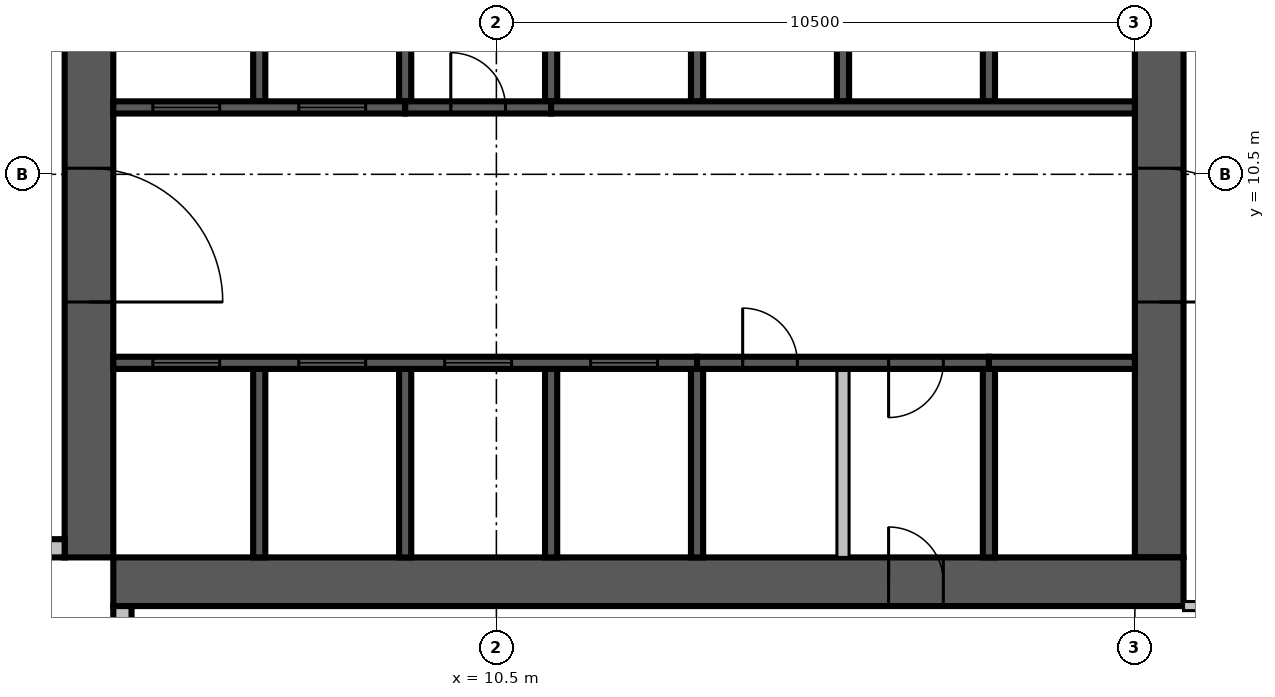
"""IFC4 building model, lengths in metres.
Left out: names, types, materials, properties, quantities, classifications, styles, units other than length and angle.
Written with IfcOpenShell. Run it as: python <this file> out.ifc"""

import sys

from ifc_helpers import new_model, si_unit, direction, frame, frame_2d, origin, place, context, subcontext, project, spatial, rectangle, extrude, source, transform, mapped, element, fill, save


model = new_model("IFC4")
c1 = context("Model", 3, precision=1e-05, world=origin(), true_north=direction((0.0, 1.0)))
c2 = subcontext(c1, "Body", "Model", "MODEL_VIEW")
j1 = project(units=[si_unit("LENGTHUNIT", "METRE"), si_unit("PLANEANGLEUNIT", "RADIAN")], contexts=[c1])
p1 = place(None, origin())
s1 = spatial("IfcSite", under=j1, at=p1, CompositionType="ELEMENT")
p2 = place(p1, origin())
s2 = spatial("IfcBuilding", under=s1, at=p2, CompositionType="ELEMENT")
p3 = place(p2, frame((0.0, 0.0, 219.6)))
s3 = spatial("IfcBuildingStorey", under=s2, at=p3, CompositionType="ELEMENT", Elevation=219.6)
m1 = source(origin(), c2, "Body", "SweptSolid", [
    extrude(rectangle(XDim=17.6, YDim=0.8, at=frame_2d((8.8, 0.0))), origin(), (0.0, 0.0, 1.0), 3.8),
])
p4 = place(p3, frame((3.8, 4.2, 0.0), z_axis=(0.0, 0.0, 1.0), x_axis=(0.0, 1.0, 0.0)))
e1 = element("IfcWall", 1, at=p4, inside=s3, PredefinedType="SHEAR", context=c2, shape_type="MappedRepresentation", body=[
    mapped(m1, transform((0.0, 0.0, 0.0), scale=1.0)),
])
m2 = source(origin(), c2, "Body", "SweptSolid", [
    extrude(rectangle(XDim=2.2, YDim=2.1, at=frame_2d((1.1, 1.05))), frame((0.0, 0.41, 0.0), z_axis=(0.0, -1.0, 0.0), x_axis=(1.0, 0.0, 0.0)), (0.0, 0.0, 1.0), 0.82),
])
p5 = place(p4, frame((4.2, 0.0, 0.0)))
e2 = element("IfcOpeningElement", 2, at=p5, cuts=e1, PredefinedType="OPENING", context=c2, shape_type="MappedRepresentation", body=[
    mapped(m2, transform((0.0, 0.0, 0.0), scale=1.0)),
])
m3 = source(origin(), c2, "Body", "SweptSolid", [
    extrude(rectangle(XDim=0.9, YDim=2.1, at=frame_2d((0.45, 1.05))), frame((0.0, 0.41, 0.0), z_axis=(0.0, -1.0, 0.0), x_axis=(1.0, 0.0, 0.0)), (0.0, 0.0, 1.0), 0.82),
])
p6 = place(p4, frame((10.95, 0.0, 0.0)))
e3 = element("IfcOpeningElement", 3, at=p6, cuts=e1, PredefinedType="OPENING", context=c2, shape_type="MappedRepresentation", body=[
    mapped(m3, transform((0.0, 0.0, 0.0), scale=1.0)),
])
m4 = source(origin(), c2, "Body", "SweptSolid", [
    extrude(rectangle(XDim=16.8, YDim=0.8, at=frame_2d((8.4, 0.0))), origin(), (0.0, 0.0, 1.0), 3.8),
])
p7 = place(p3, frame((21.4, 4.2, 0.0), z_axis=(0.0, 0.0, 1.0), x_axis=(0.0, 1.0, 0.0)))
e4 = element("IfcWall", 4, at=p7, inside=s3, PredefinedType="SHEAR", context=c2, shape_type="MappedRepresentation", body=[
    mapped(m4, transform((0.0, 0.0, 0.0), scale=1.0)),
])
p8 = place(p7, frame((4.2, 0.0, 0.0)))
e5 = element("IfcOpeningElement", 5, at=p8, cuts=e4, PredefinedType="OPENING", context=c2, shape_type="MappedRepresentation", body=[
    mapped(m2, transform((0.0, 0.0, 0.0), scale=1.0)),
])
m5 = source(origin(), c2, "Body", "SweptSolid", [
    extrude(rectangle(XDim=1.2, YDim=2.1, at=frame_2d((0.6, 1.05))), frame((0.0, 0.41, 0.0), z_axis=(0.0, -1.0, 0.0), x_axis=(1.0, 0.0, 0.0)), (0.0, 0.0, 1.0), 0.82),
])
p9 = place(p7, frame((14.7, 0.0, 0.0)))
e6 = element("IfcOpeningElement", 6, at=p9, cuts=e4, PredefinedType="OPENING", context=c2, shape_type="MappedRepresentation", body=[
    mapped(m5, transform((0.0, 0.0, 0.0), scale=1.0)),
])
p10 = place(p3, frame((4.2, 3.8, 0.0), z_axis=(0.0, 0.0, 1.0), x_axis=(1.0, 0.0, 0.0)))
e7 = element("IfcWall", 7, at=p10, inside=s3, PredefinedType="SHEAR", context=c2, shape_type="MappedRepresentation", body=[
    mapped(m1, transform((0.0, 0.0, 0.0), scale=1.0)),
])
p11 = place(p10, frame((12.75, 0.0, 0.0)))
e8 = element("IfcOpeningElement", 8, at=p11, cuts=e7, PredefinedType="OPENING", context=c2, shape_type="MappedRepresentation", body=[
    mapped(m3, transform((0.0, 0.0, 0.0), scale=1.0)),
])
m6 = source(origin(), c2, "Body", "SweptSolid", [
    extrude(rectangle(XDim=3.4, YDim=0.3, at=frame_2d((1.7, 0.0))), origin(), (0.0, 0.0, 1.0), 3.4),
])
p12 = place(p3, frame((0.0, 4.35, 0.0), z_axis=(0.0, 0.0, 1.0), x_axis=(1.0, 0.0, 0.0)))
e9 = element("IfcWall", 9, at=p12, inside=s3, PredefinedType="STANDARD", context=c2, shape_type="MappedRepresentation", body=[
    mapped(m6, transform((0.0, 0.0, 0.0), scale=1.0)),
])
m7 = source(origin(), c2, "Body", "SweptSolid", [
    extrude(rectangle(XDim=1.8, YDim=2.3, at=frame_2d((0.9, 1.15))), frame((0.0, 0.16, 0.0), z_axis=(0.0, -1.0, 0.0), x_axis=(1.0, 0.0, 0.0)), (0.0, 0.0, 1.0), 0.32),
])
p13 = place(p12, frame((1.2, 0.0, 0.6)))
e10 = element("IfcOpeningElement", 10, at=p13, cuts=e9, PredefinedType="OPENING", context=c2, shape_type="MappedRepresentation", body=[
    mapped(m7, transform((0.0, 0.0, 0.0), scale=1.0)),
])
p14 = place(p3, frame((4.35, 3.4, 0.0), z_axis=(0.0, 0.0, 1.0), x_axis=(0.0, -1.0, 0.0)))
e11 = element("IfcWall", 11, at=p14, inside=s3, PredefinedType="STANDARD", context=c2, shape_type="MappedRepresentation", body=[
    mapped(m6, transform((0.0, 0.0, 0.0), scale=1.0)),
])
p15 = place(p14, frame((0.4, 0.0, 0.6)))
e12 = element("IfcOpeningElement", 12, at=p15, cuts=e11, PredefinedType="OPENING", context=c2, shape_type="MappedRepresentation", body=[
    mapped(m7, transform((0.0, 0.0, 0.0), scale=1.0)),
])
m8 = source(origin(), c2, "Body", "SweptSolid", [
    extrude(rectangle(XDim=3.1, YDim=0.2, at=frame_2d((1.55, 0.0))), origin(), (0.0, 0.0, 1.0), 3.8),
])
for number, where, z_axis, x_axis in (
    (13, (6.6, 4.2, 0.0), (0.0, 0.0, 1.0), (0.0, 1.0, 0.0)),
    (14, (9.0, 4.2, 0.0), (0.0, 0.0, 1.0), (0.0, 1.0, 0.0)),
    (15, (11.4, 4.2, 0.0), (0.0, 0.0, 1.0), (0.0, 1.0, 0.0)),
):
    element("IfcWall", number, at=place(p3, frame(where, z_axis=z_axis, x_axis=x_axis)), inside=s3, PredefinedType="SOLIDWALL", context=c2, shape_type="MappedRepresentation", body=[
        mapped(m8, transform((0.0, 0.0, 0.0), scale=1.0)),
    ])
m9 = source(origin(), c2, "Body", "SweptSolid", [
    extrude(rectangle(XDim=3.1, YDim=0.2, at=frame_2d((1.55, 0.0))), origin(), (0.0, 0.0, 1.0), 3.4),
])
for number, where, z_axis, x_axis in (
    (16, (13.8, 4.2, 0.0), (0.0, 0.0, 1.0), (0.0, 1.0, 0.0)),
    (17, (18.6, 4.2, 0.0), (0.0, 0.0, 1.0), (0.0, 1.0, 0.0)),
):
    element("IfcWall", number, at=place(p3, frame(where, z_axis=z_axis, x_axis=x_axis)), inside=s3, PredefinedType="SOLIDWALL", context=c2, shape_type="MappedRepresentation", body=[
        mapped(m9, transform((0.0, 0.0, 0.0), scale=1.0)),
    ])
m10 = source(origin(), c2, "Body", "SweptSolid", [
    extrude(rectangle(XDim=3.1, YDim=0.2, at=frame_2d((1.55, 0.0))), origin(), (0.0, 0.0, 1.0), 3.4),
])
p16 = place(p3, frame((16.2, 4.2, 0.0), z_axis=(0.0, 0.0, 1.0), x_axis=(0.0, 1.0, 0.0)))
e18 = element("IfcWall", 18, at=p16, inside=s3, PredefinedType="PARTITIONING", context=c2, shape_type="MappedRepresentation", body=[
    mapped(m10, transform((0.0, 0.0, 0.0), scale=1.0)),
])
m11 = source(origin(), c2, "Body", "SweptSolid", [
    extrude(rectangle(XDim=3.0, YDim=0.2, at=frame_2d((1.5, 0.0))), origin(), (0.0, 0.0, 1.0), 3.8),
])
p17 = place(p3, frame((6.6, 11.7, 0.0), z_axis=(0.0, 0.0, 1.0), x_axis=(0.0, 1.0, 0.0)))
e19 = element("IfcWall", 19, at=p17, inside=s3, PredefinedType="SOLIDWALL", context=c2, shape_type="MappedRepresentation", body=[
    mapped(m11, transform((0.0, 0.0, 0.0), scale=1.0)),
])
m12 = source(origin(), c2, "Body", "SweptSolid", [
    extrude(rectangle(XDim=3.0, YDim=0.2, at=frame_2d((1.5, 0.0))), origin(), (0.0, 0.0, 1.0), 3.4),
])
for number, where, z_axis, x_axis in (
    (20, (9.0, 11.7, 0.0), (0.0, 0.0, 1.0), (0.0, 1.0, 0.0)),
    (21, (11.4, 11.7, 0.0), (0.0, 0.0, 1.0), (0.0, 1.0, 0.0)),
):
    element("IfcWall", number, at=place(p3, frame(where, z_axis=z_axis, x_axis=x_axis)), inside=s3, PredefinedType="SOLIDWALL", context=c2, shape_type="MappedRepresentation", body=[
        mapped(m12, transform((0.0, 0.0, 0.0), scale=1.0)),
    ])
for number, where, z_axis, x_axis in (
    (22, (13.8, 11.7, 0.0), (0.0, 0.0, 1.0), (0.0, 1.0, 0.0)),
    (23, (16.2, 11.7, 0.0), (0.0, 0.0, 1.0), (0.0, 1.0, 0.0)),
    (24, (18.6, 11.7, 0.0), (0.0, 0.0, 1.0), (0.0, 1.0, 0.0)),
):
    element("IfcWall", number, at=place(p3, frame(where, z_axis=z_axis, x_axis=x_axis)), inside=s3, PredefinedType="SOLIDWALL", context=c2, shape_type="MappedRepresentation", body=[
        mapped(m11, transform((0.0, 0.0, 0.0), scale=1.0)),
    ])
m13 = source(origin(), c2, "Body", "SweptSolid", [
    extrude(rectangle(XDim=9.6, YDim=0.2, at=frame_2d((4.8, 0.0))), origin(), (0.0, 0.0, 1.0), 3.8),
])
p18 = place(p3, frame((4.2, 7.4, 0.0), z_axis=(0.0, 0.0, 1.0), x_axis=(1.0, 0.0, 0.0)))
e25 = element("IfcWall", 25, at=p18, inside=s3, PredefinedType="SOLIDWALL", context=c2, shape_type="MappedRepresentation", body=[
    mapped(m13, transform((0.0, 0.0, 0.0), scale=1.0)),
])
m14 = source(origin(), c2, "Body", "SweptSolid", [
    extrude(rectangle(XDim=1.1, YDim=2.1, at=frame_2d((0.55, 1.05))), frame((0.0, 0.11, 0.0), z_axis=(0.0, -1.0, 0.0), x_axis=(1.0, 0.0, 0.0)), (0.0, 0.0, 1.0), 0.22),
])
p19 = place(p18, frame((0.65, 0.0, 0.0)))
e26 = element("IfcOpeningElement", 26, at=p19, cuts=e25, PredefinedType="OPENING", context=c2, shape_type="MappedRepresentation", body=[
    mapped(m14, transform((0.0, 0.0, 0.0), scale=1.0)),
])
p20 = place(p18, frame((3.05, 0.0, 0.0)))
e27 = element("IfcOpeningElement", 27, at=p20, cuts=e25, PredefinedType="OPENING", context=c2, shape_type="MappedRepresentation", body=[
    mapped(m14, transform((0.0, 0.0, 0.0), scale=1.0)),
])
p21 = place(p18, frame((5.45, 0.0, 0.0)))
e28 = element("IfcOpeningElement", 28, at=p21, cuts=e25, PredefinedType="OPENING", context=c2, shape_type="MappedRepresentation", body=[
    mapped(m14, transform((0.0, 0.0, 0.0), scale=1.0)),
])
p22 = place(p18, frame((7.85, 0.0, 0.0)))
e29 = element("IfcOpeningElement", 29, at=p22, cuts=e25, PredefinedType="OPENING", context=c2, shape_type="MappedRepresentation", body=[
    mapped(m14, transform((0.0, 0.0, 0.0), scale=1.0)),
])
m15 = source(origin(), c2, "Body", "SweptSolid", [
    extrude(rectangle(XDim=4.8, YDim=0.2, at=frame_2d((2.4, 0.0))), origin(), (0.0, 0.0, 1.0), 3.4),
])
p23 = place(p3, frame((13.8, 7.4, 0.0), z_axis=(0.0, 0.0, 1.0), x_axis=(1.0, 0.0, 0.0)))
e30 = element("IfcWall", 30, at=p23, inside=s3, PredefinedType="SOLIDWALL", context=c2, shape_type="MappedRepresentation", body=[
    mapped(m15, transform((0.0, 0.0, 0.0), scale=1.0)),
])
m16 = source(origin(), c2, "Body", "SweptSolid", [
    extrude(rectangle(XDim=0.9, YDim=2.1, at=frame_2d((0.45, 1.05))), frame((0.0, 0.11, 0.0), z_axis=(0.0, -1.0, 0.0), x_axis=(1.0, 0.0, 0.0)), (0.0, 0.0, 1.0), 0.22),
])
p24 = place(p23, frame((0.75, 0.0, 0.0)))
e31 = element("IfcOpeningElement", 31, at=p24, cuts=e30, PredefinedType="OPENING", context=c2, shape_type="MappedRepresentation", body=[
    mapped(m16, transform((0.0, 0.0, 0.0), scale=1.0)),
])
p25 = place(p23, frame((3.15, 0.0, 0.0)))
e32 = element("IfcOpeningElement", 32, at=p25, cuts=e30, PredefinedType="OPENING", context=c2, shape_type="MappedRepresentation", body=[
    mapped(m16, transform((0.0, 0.0, 0.0), scale=1.0)),
])
m17 = source(origin(), c2, "Body", "SweptSolid", [
    extrude(rectangle(XDim=2.4, YDim=0.2, at=frame_2d((1.2, 0.0))), origin(), (0.0, 0.0, 1.0), 3.8),
])
p26 = place(p3, frame((18.6, 7.4, 0.0), z_axis=(0.0, 0.0, 1.0), x_axis=(1.0, 0.0, 0.0)))
e33 = element("IfcWall", 33, at=p26, inside=s3, PredefinedType="SOLIDWALL", context=c2, shape_type="MappedRepresentation", body=[
    mapped(m17, transform((0.0, 0.0, 0.0), scale=1.0)),
])
m18 = source(origin(), c2, "Body", "SweptSolid", [
    extrude(rectangle(XDim=4.8, YDim=0.2, at=frame_2d((2.4, 0.0))), origin(), (0.0, 0.0, 1.0), 3.8),
])
p27 = place(p3, frame((4.2, 11.6, 0.0), z_axis=(0.0, 0.0, 1.0), x_axis=(1.0, 0.0, 0.0)))
e34 = element("IfcWall", 34, at=p27, inside=s3, PredefinedType="SOLIDWALL", context=c2, shape_type="MappedRepresentation", body=[
    mapped(m18, transform((0.0, 0.0, 0.0), scale=1.0)),
])
p28 = place(p27, frame((0.65, 0.0, 0.0)))
e35 = element("IfcOpeningElement", 35, at=p28, cuts=e34, PredefinedType="OPENING", context=c2, shape_type="MappedRepresentation", body=[
    mapped(m14, transform((0.0, 0.0, 0.0), scale=1.0)),
])
p29 = place(p27, frame((3.05, 0.0, 0.0)))
e36 = element("IfcOpeningElement", 36, at=p29, cuts=e34, PredefinedType="OPENING", context=c2, shape_type="MappedRepresentation", body=[
    mapped(m14, transform((0.0, 0.0, 0.0), scale=1.0)),
])
m19 = source(origin(), c2, "Body", "SweptSolid", [
    extrude(rectangle(XDim=2.4, YDim=0.2, at=frame_2d((1.2, 0.0))), origin(), (0.0, 0.0, 1.0), 3.4),
])
p30 = place(p3, frame((9.0, 11.6, 0.0), z_axis=(0.0, 0.0, 1.0), x_axis=(1.0, 0.0, 0.0)))
e37 = element("IfcWall", 37, at=p30, inside=s3, PredefinedType="SOLIDWALL", context=c2, shape_type="MappedRepresentation", body=[
    mapped(m19, transform((0.0, 0.0, 0.0), scale=1.0)),
])
p31 = place(p30, frame((0.75, 0.0, 0.0)))
e38 = element("IfcOpeningElement", 38, at=p31, cuts=e37, PredefinedType="OPENING", context=c2, shape_type="MappedRepresentation", body=[
    mapped(m16, transform((0.0, 0.0, 0.0), scale=1.0)),
])
p32 = place(p3, frame((11.4, 11.6, 0.0), z_axis=(0.0, 0.0, 1.0), x_axis=(1.0, 0.0, 0.0)))
e39 = element("IfcWall", 39, at=p32, inside=s3, PredefinedType="SOLIDWALL", context=c2, shape_type="MappedRepresentation", body=[
    mapped(m13, transform((0.0, 0.0, 0.0), scale=1.0)),
])
m20 = source(origin(), c2, "Body", "SweptSolid", [
    extrude(rectangle(XDim=7.525, YDim=0.15, at=frame_2d((3.763, 0.0))), origin(), (0.0, 0.0, 1.0), 3.4),
])
p33 = place(p3, frame((21.8, 3.4, 0.0), z_axis=(0.0, 0.0, 1.0), x_axis=(1.0, 0.0, 0.0)))
e40 = element("IfcWall", 40, at=p33, inside=s3, PredefinedType="PARTITIONING", context=c2, shape_type="MappedRepresentation", body=[
    mapped(m20, transform((0.0, 0.0, 0.0), scale=1.0)),
])
m21 = source(origin(), c2, "Body", "SweptSolid", [
    extrude(rectangle(XDim=1.0, YDim=2.1, at=frame_2d((0.5, 1.05))), frame((0.0, 0.085, 0.0), z_axis=(0.0, -1.0, 0.0), x_axis=(1.0, 0.0, 0.0)), (0.0, 0.0, 1.0), 0.17),
])
p34 = place(p33, frame((3.3, 0.0, 0.0)))
e41 = element("IfcOpeningElement", 41, at=p34, cuts=e40, PredefinedType="OPENING", context=c2, shape_type="MappedRepresentation", body=[
    mapped(m21, transform((0.0, 0.0, 0.0), scale=1.0)),
])
m22 = source(origin(), c2, "Body", "SweptSolid", [
    extrude(rectangle(XDim=0.9, YDim=2.1, at=frame_2d((0.45, 1.05))), frame((0.0, 0.085, 0.0), z_axis=(0.0, -1.0, 0.0), x_axis=(1.0, 0.0, 0.0)), (0.0, 0.0, 1.0), 0.17),
])
p35 = place(p33, frame((4.363, 0.0, 0.0)))
e42 = element("IfcOpeningElement", 42, at=p35, cuts=e40, PredefinedType="OPENING", context=c2, shape_type="MappedRepresentation", body=[
    mapped(m22, transform((0.0, 0.0, 0.0), scale=1.0)),
])
m23 = source(origin(), c2, "Body", "SweptSolid", [
    extrude(rectangle(XDim=1.1, YDim=2.1, at=frame_2d((0.55, 1.05))), frame((0.0, 0.025, 0.0), z_axis=(0.0, -1.0, 0.0), x_axis=(1.0, 0.0, 0.0)), (0.0, 0.0, 1.0), 0.05),
])
p36 = place(p19, origin())
e43 = element("IfcDoor", 43, at=p36, inside=s3, OperationType="SLIDING_TO_LEFT", PredefinedType="DOOR", context=c2, shape_type="MappedRepresentation", body=[
    mapped(m23, transform((0.0, 0.0, 0.0), scale=1.0)),
])
fill(e26, e43)
p37 = place(p20, origin())
e44 = element("IfcDoor", 44, at=p37, inside=s3, OperationType="SLIDING_TO_LEFT", PredefinedType="DOOR", context=c2, shape_type="MappedRepresentation", body=[
    mapped(m23, transform((0.0, 0.0, 0.0), scale=1.0)),
])
fill(e27, e44)
p38 = place(p21, origin())
e45 = element("IfcDoor", 45, at=p38, inside=s3, OperationType="SLIDING_TO_LEFT", PredefinedType="DOOR", context=c2, shape_type="MappedRepresentation", body=[
    mapped(m23, transform((0.0, 0.0, 0.0), scale=1.0)),
])
fill(e28, e45)
p39 = place(p22, origin())
e46 = element("IfcDoor", 46, at=p39, inside=s3, OperationType="SLIDING_TO_LEFT", PredefinedType="DOOR", context=c2, shape_type="MappedRepresentation", body=[
    mapped(m23, transform((0.0, 0.0, 0.0), scale=1.0)),
])
fill(e29, e46)
m24 = source(origin(), c2, "Body", "SweptSolid", [
    extrude(rectangle(XDim=0.9, YDim=2.1, at=frame_2d((0.45, 1.05))), frame((0.0, 0.025, 0.0), z_axis=(0.0, -1.0, 0.0), x_axis=(1.0, 0.0, 0.0)), (0.0, 0.0, 1.0), 0.05),
])
p40 = place(p24, origin())
e47 = element("IfcDoor", 47, at=p40, inside=s3, OperationType="SINGLE_SWING_LEFT", PredefinedType="DOOR", context=c2, shape_type="MappedRepresentation", body=[
    mapped(m24, transform((0.0, 0.0, 0.0), scale=1.0)),
])
fill(e31, e47)
p41 = place(p25, origin())
e48 = element("IfcDoor", 48, at=p41, inside=s3, OperationType="SINGLE_SWING_RIGHT", PredefinedType="DOOR", context=c2, shape_type="MappedRepresentation", body=[
    mapped(m24, transform((0.0, 0.0, 0.0), scale=1.0)),
])
fill(e32, e48)
p42 = place(p28, origin())
e49 = element("IfcDoor", 49, at=p42, inside=s3, OperationType="SLIDING_TO_LEFT", PredefinedType="DOOR", context=c2, shape_type="MappedRepresentation", body=[
    mapped(m23, transform((0.0, 0.0, 0.0), scale=1.0)),
])
fill(e35, e49)
p43 = place(p29, origin())
e50 = element("IfcDoor", 50, at=p43, inside=s3, OperationType="SLIDING_TO_LEFT", PredefinedType="DOOR", context=c2, shape_type="MappedRepresentation", body=[
    mapped(m23, transform((0.0, 0.0, 0.0), scale=1.0)),
])
fill(e36, e50)
p44 = place(p31, origin())
e51 = element("IfcDoor", 51, at=p44, inside=s3, OperationType="SINGLE_SWING_LEFT", PredefinedType="DOOR", context=c2, shape_type="MappedRepresentation", body=[
    mapped(m24, transform((0.0, 0.0, 0.0), scale=1.0)),
])
fill(e38, e51)
m25 = source(origin(), c2, "Body", "SweptSolid", [
    extrude(rectangle(XDim=2.2, YDim=2.1, at=frame_2d((1.1, 1.05))), frame((0.0, 0.025, 0.0), z_axis=(0.0, -1.0, 0.0), x_axis=(1.0, 0.0, 0.0)), (0.0, 0.0, 1.0), 0.05),
])
p45 = place(p8, origin())
e52 = element("IfcDoor", 52, at=p45, inside=s3, OperationType="DOUBLE_DOOR_SINGLE_SWING", PredefinedType="DOOR", context=c2, shape_type="MappedRepresentation", body=[
    mapped(m25, transform((0.0, 0.0, 0.0), scale=1.0)),
])
fill(e5, e52)
p46 = place(p5, origin())
e53 = element("IfcDoor", 53, at=p46, inside=s3, OperationType="DOUBLE_DOOR_SINGLE_SWING", PredefinedType="DOOR", context=c2, shape_type="MappedRepresentation", body=[
    mapped(m25, transform((0.0, 0.0, 0.0), scale=1.0)),
])
fill(e2, e53)
p47 = place(p11, origin())
e54 = element("IfcDoor", 54, at=p47, inside=s3, OperationType="SINGLE_SWING_LEFT", PredefinedType="DOOR", context=c2, shape_type="MappedRepresentation", body=[
    mapped(m24, transform((0.0, 0.0, 0.0), scale=1.0)),
])
fill(e8, e54)
save(model, sys.argv[1])
